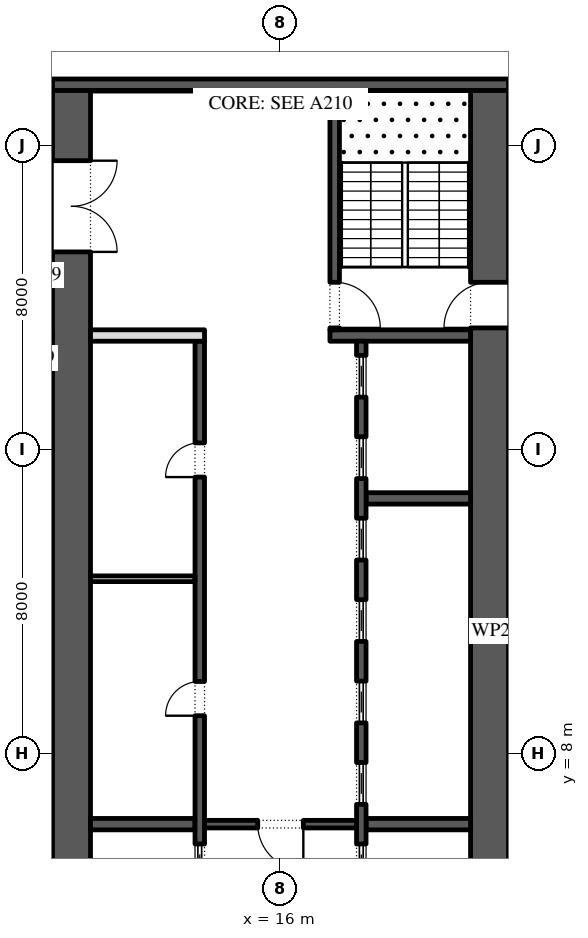
"""IFC4 building model, lengths in metres.
Left out: names, types, materials, properties, quantities, classifications, styles, units other than length and angle.
Written with IfcOpenShell. Run it as: python <this file> out.ifc"""

import sys

from ifc_helpers import new_model, si_unit, direction, frame, frame_2d, origin, place, context, subcontext, project, spatial, rectangle, extrude, element, fill, save


model = new_model("IFC4")
c1 = context("Model", 3, precision=1e-05, world=origin(), true_north=direction((0.0, 1.0)))
c2 = subcontext(c1, "Body", "Model", "MODEL_VIEW")
j1 = project(units=[si_unit("LENGTHUNIT", "METRE"), si_unit("PLANEANGLEUNIT", "RADIAN")], contexts=[c1])
p1 = place(None, origin())
s1 = spatial("IfcSite", under=j1, at=p1, CompositionType="ELEMENT")
p2 = place(p1, origin())
s2 = spatial("IfcBuilding", under=s1, at=p2, CompositionType="ELEMENT")
p3 = place(p2, frame((0.0, 0.0, 39.6)))
s3 = spatial("IfcBuildingStorey", under=s2, at=p3, CompositionType="ELEMENT", Elevation=39.6)
p4 = place(p3, frame((21.5, -2.45, 0.0), z_axis=(0.0, 0.0, 1.0), x_axis=(0.0, 1.0, 0.0)))
e1 = element("IfcWall", 1, at=p4, inside=s3, PredefinedType="SHEAR", context=c2, shape_type="SweptSolid", body=[
    extrude(rectangle(XDim=27.9, YDim=1.0, at=frame_2d((13.95, 0.0))), origin(), (0.0, 0.0, 1.0), 4.0),
])
p5 = place(p4, frame((5.05, 0.0, 0.0)))
e2 = element("IfcOpeningElement", 2, at=p5, cuts=e1, PredefinedType="OPENING", context=c2, shape_type="SweptSolid", body=[
    extrude(rectangle(XDim=1.2, YDim=2.1, at=frame_2d((0.6, 1.05))), frame((0.0, 0.51, 0.0), z_axis=(0.0, -1.0, 0.0), x_axis=(1.0, 0.0, 0.0)), (0.0, 0.0, 1.0), 1.02),
])
p6 = place(p4, frame((21.65, 0.0, 0.0)))
e3 = element("IfcOpeningElement", 3, at=p6, cuts=e1, PredefinedType="OPENING", context=c2, shape_type="SweptSolid", body=[
    extrude(rectangle(XDim=1.2, YDim=2.1, at=frame_2d((0.6, 1.05))), frame((0.0, 0.51, 0.0), z_axis=(0.0, -1.0, 0.0), x_axis=(1.0, 0.0, 0.0)), (0.0, 0.0, 1.0), 1.02),
])
p7 = place(p3, frame((10.5, -2.45, 0.0), z_axis=(0.0, 0.0, 1.0), x_axis=(0.0, 1.0, 0.0)))
e4 = element("IfcWall", 4, at=p7, inside=s3, PredefinedType="SHEAR", context=c2, shape_type="SweptSolid", body=[
    extrude(rectangle(XDim=27.9, YDim=1.0, at=frame_2d((13.95, 0.0))), origin(), (0.0, 0.0, 1.0), 4.0),
])
p8 = place(p7, frame((23.65, 0.0, 0.0)))
e5 = element("IfcOpeningElement", 5, at=p8, cuts=e4, PredefinedType="OPENING", context=c2, shape_type="SweptSolid", body=[
    extrude(rectangle(XDim=2.4, YDim=2.1, at=frame_2d((1.2, 1.05))), frame((0.0, 0.51, 0.0), z_axis=(0.0, -1.0, 0.0), x_axis=(1.0, 0.0, 0.0)), (0.0, 0.0, 1.0), 1.02),
])
p9 = place(p7, frame((1.387, 0.0, 0.0)))
e6 = element("IfcOpeningElement", 6, at=p9, cuts=e4, PredefinedType="OPENING", context=c2, shape_type="SweptSolid", body=[
    extrude(rectangle(XDim=0.9, YDim=2.1, at=frame_2d((0.45, 1.05))), frame((0.0, 0.51, 0.0), z_axis=(0.0, -1.0, 0.0), x_axis=(1.0, 0.0, 0.0)), (0.0, 0.0, 1.0), 1.02),
])
p10 = place(p7, frame((4.613, 0.0, 0.0)))
e7 = element("IfcOpeningElement", 7, at=p10, cuts=e4, PredefinedType="OPENING", context=c2, shape_type="SweptSolid", body=[
    extrude(rectangle(XDim=0.9, YDim=2.1, at=frame_2d((0.45, 1.05))), frame((0.0, 0.51, 0.0), z_axis=(0.0, -1.0, 0.0), x_axis=(1.0, 0.0, 0.0)), (0.0, 0.0, 1.0), 1.02),
])
p11 = place(p3, frame((10.0, 25.6, 0.0), z_axis=(0.0, 0.0, 1.0), x_axis=(1.0, 0.0, 0.0)))
e8 = element("IfcWall", 8, at=p11, inside=s3, PredefinedType="SHEAR", context=c2, shape_type="SweptSolid", body=[
    extrude(rectangle(XDim=12.0, YDim=0.3, at=frame_2d((6.0, 0.0))), origin(), (0.0, 0.0, 1.0), 4.0),
])
p12 = place(p3, frame((17.3, 19.0, 0.0), z_axis=(0.0, 0.0, 1.0), x_axis=(1.0, 0.0, 0.0)))
e9 = element("IfcWall", 9, at=p12, inside=s3, PredefinedType="SHEAR", context=c2, shape_type="SweptSolid", body=[
    extrude(rectangle(XDim=3.7, YDim=0.3, at=frame_2d((1.85, 0.0))), origin(), (0.0, 0.0, 1.0), 4.0),
])
p13 = place(p3, frame((17.425, 19.15, 0.0), z_axis=(0.0, 0.0, 1.0), x_axis=(0.0, 1.0, 0.0)))
e10 = element("IfcWall", 10, at=p13, inside=s3, PredefinedType="SHEAR", context=c2, shape_type="SweptSolid", body=[
    extrude(rectangle(XDim=6.3, YDim=0.25, at=frame_2d((3.15, 0.0))), origin(), (0.0, 0.0, 1.0), 4.0),
])
p14 = place(p13, frame((0.05, 0.0, 0.0)))
e11 = element("IfcOpeningElement", 11, at=p14, cuts=e10, PredefinedType="OPENING", context=c2, shape_type="SweptSolid", body=[
    extrude(rectangle(XDim=1.2, YDim=2.1, at=frame_2d((0.6, 1.05))), frame((0.0, 0.135, 0.0), z_axis=(0.0, -1.0, 0.0), x_axis=(1.0, 0.0, 0.0)), (0.0, 0.0, 1.0), 0.27),
])
for number, where, z_axis, x_axis in (
    (12, (18.25, 6.143, 0.0), (0.0, 0.0, 1.0), (1.0, 0.0, 0.0)),
    (13, (18.25, 14.714, 0.0), (0.0, 0.0, 1.0), (1.0, 0.0, 0.0)),
):
    element("IfcWall", number, at=place(p3, frame(where, z_axis=z_axis, x_axis=x_axis)), inside=s3, PredefinedType="SHEAR", context=c2, shape_type="SweptSolid", body=[
        extrude(rectangle(XDim=2.75, YDim=0.3, at=frame_2d((1.375, 0.0))), origin(), (0.0, 0.0, 1.0), 4.0),
    ])
p15 = place(p3, frame((18.125, 4.15, 0.0), z_axis=(0.0, 0.0, 1.0), x_axis=(0.0, 1.0, 0.0)))
e14 = element("IfcWall", 14, at=p15, inside=s3, PredefinedType="SHEAR", context=c2, shape_type="SweptSolid", body=[
    extrude(rectangle(XDim=14.7, YDim=0.25, at=frame_2d((7.35, 0.0))), origin(), (0.0, 0.0, 1.0), 4.0),
])
p16 = place(p15, frame((0.371, 0.0, 0.0)))
e15 = element("IfcOpeningElement", 15, at=p16, cuts=e14, PredefinedType="OPENING", context=c2, shape_type="SweptSolid", body=[
    extrude(rectangle(XDim=1.1, YDim=2.1, at=frame_2d((0.55, 1.05))), frame((0.0, 0.135, 0.0), z_axis=(0.0, -1.0, 0.0), x_axis=(1.0, 0.0, 0.0)), (0.0, 0.0, 1.0), 0.27),
])
p17 = place(p15, frame((2.514, 0.0, 0.0)))
e16 = element("IfcOpeningElement", 16, at=p17, cuts=e14, PredefinedType="OPENING", context=c2, shape_type="SweptSolid", body=[
    extrude(rectangle(XDim=1.1, YDim=2.1, at=frame_2d((0.55, 1.05))), frame((0.0, 0.135, 0.0), z_axis=(0.0, -1.0, 0.0), x_axis=(1.0, 0.0, 0.0)), (0.0, 0.0, 1.0), 0.27),
])
p18 = place(p15, frame((4.657, 0.0, 0.0)))
e17 = element("IfcOpeningElement", 17, at=p18, cuts=e14, PredefinedType="OPENING", context=c2, shape_type="SweptSolid", body=[
    extrude(rectangle(XDim=1.1, YDim=2.1, at=frame_2d((0.55, 1.05))), frame((0.0, 0.135, 0.0), z_axis=(0.0, -1.0, 0.0), x_axis=(1.0, 0.0, 0.0)), (0.0, 0.0, 1.0), 0.27),
])
p19 = place(p15, frame((6.8, 0.0, 0.0)))
e18 = element("IfcOpeningElement", 18, at=p19, cuts=e14, PredefinedType="OPENING", context=c2, shape_type="SweptSolid", body=[
    extrude(rectangle(XDim=1.1, YDim=2.1, at=frame_2d((0.55, 1.05))), frame((0.0, 0.135, 0.0), z_axis=(0.0, -1.0, 0.0), x_axis=(1.0, 0.0, 0.0)), (0.0, 0.0, 1.0), 0.27),
])
p20 = place(p15, frame((8.943, 0.0, 0.0)))
e19 = element("IfcOpeningElement", 19, at=p20, cuts=e14, PredefinedType="OPENING", context=c2, shape_type="SweptSolid", body=[
    extrude(rectangle(XDim=1.1, YDim=2.1, at=frame_2d((0.55, 1.05))), frame((0.0, 0.135, 0.0), z_axis=(0.0, -1.0, 0.0), x_axis=(1.0, 0.0, 0.0)), (0.0, 0.0, 1.0), 0.27),
])
p21 = place(p15, frame((11.086, 0.0, 0.0)))
e20 = element("IfcOpeningElement", 20, at=p21, cuts=e14, PredefinedType="OPENING", context=c2, shape_type="SweptSolid", body=[
    extrude(rectangle(XDim=1.1, YDim=2.1, at=frame_2d((0.55, 1.05))), frame((0.0, 0.135, 0.0), z_axis=(0.0, -1.0, 0.0), x_axis=(1.0, 0.0, 0.0)), (0.0, 0.0, 1.0), 0.27),
])
p22 = place(p15, frame((13.229, 0.0, 0.0)))
e21 = element("IfcOpeningElement", 21, at=p22, cuts=e14, PredefinedType="OPENING", context=c2, shape_type="SweptSolid", body=[
    extrude(rectangle(XDim=1.1, YDim=2.1, at=frame_2d((0.55, 1.05))), frame((0.0, 0.135, 0.0), z_axis=(0.0, -1.0, 0.0), x_axis=(1.0, 0.0, 0.0)), (0.0, 0.0, 1.0), 0.27),
])
p23 = place(p3, frame((11.0, 6.143, 0.0), z_axis=(0.0, 0.0, 1.0), x_axis=(1.0, 0.0, 0.0)))
e22 = element("IfcWall", 22, at=p23, inside=s3, PredefinedType="SHEAR", context=c2, shape_type="SweptSolid", body=[
    extrude(rectangle(XDim=2.75, YDim=0.3, at=frame_2d((1.375, 0.0))), origin(), (0.0, 0.0, 1.0), 4.0),
])
p24 = place(p3, frame((13.875, -2.45, 0.0), z_axis=(0.0, 0.0, 1.0), x_axis=(0.0, 1.0, 0.0)))
e23 = element("IfcWall", 23, at=p24, inside=s3, PredefinedType="SHEAR", context=c2, shape_type="SweptSolid", body=[
    extrude(rectangle(XDim=21.3, YDim=0.25, at=frame_2d((10.65, 0.0))), origin(), (0.0, 0.0, 1.0), 4.0),
])
p25 = place(p24, frame((11.446, 0.0, 0.0)))
e24 = element("IfcOpeningElement", 24, at=p25, cuts=e23, PredefinedType="OPENING", context=c2, shape_type="SweptSolid", body=[
    extrude(rectangle(XDim=0.9, YDim=2.1, at=frame_2d((0.45, 1.05))), frame((0.0, 0.135, 0.0), z_axis=(0.0, -1.0, 0.0), x_axis=(1.0, 0.0, 0.0)), (0.0, 0.0, 1.0), 0.27),
])
p26 = place(p24, frame((17.725, 0.0, 0.0)))
e25 = element("IfcOpeningElement", 25, at=p26, cuts=e23, PredefinedType="OPENING", context=c2, shape_type="SweptSolid", body=[
    extrude(rectangle(XDim=0.9, YDim=2.1, at=frame_2d((0.45, 1.05))), frame((0.0, 0.135, 0.0), z_axis=(0.0, -1.0, 0.0), x_axis=(1.0, 0.0, 0.0)), (0.0, 0.0, 1.0), 0.27),
])
p27 = place(p24, frame((6.971, 0.0, 0.0)))
e26 = element("IfcOpeningElement", 26, at=p27, cuts=e23, PredefinedType="OPENING", context=c2, shape_type="SweptSolid", body=[
    extrude(rectangle(XDim=1.1, YDim=2.1, at=frame_2d((0.55, 1.05))), frame((0.0, 0.135, 0.0), z_axis=(0.0, -1.0, 0.0), x_axis=(1.0, 0.0, 0.0)), (0.0, 0.0, 1.0), 0.27),
])
p28 = place(p3, frame((11.0, 19.0, 0.0), z_axis=(0.0, 0.0, 1.0), x_axis=(1.0, 0.0, 0.0)))
e27 = element("IfcWall", 27, at=p28, inside=s3, PredefinedType="PARTITIONING", context=c2, shape_type="SweptSolid", body=[
    extrude(rectangle(XDim=3.0, YDim=0.3, at=frame_2d((1.5, 0.0))), origin(), (0.0, 0.0, 1.0), 4.0),
])
p29 = place(p3, frame((11.0, 12.6, 0.0), z_axis=(0.0, 0.0, 1.0), x_axis=(1.0, 0.0, 0.0)))
e28 = element("IfcWall", 28, at=p29, inside=s3, PredefinedType="PARTITIONING", context=c2, shape_type="SweptSolid", body=[
    extrude(rectangle(XDim=2.75, YDim=0.15, at=frame_2d((1.375, 0.0))), origin(), (0.0, 0.0, 1.0), 4.0),
])
p30 = place(p3, frame((14.0, 6.143, 0.0), z_axis=(0.0, 0.0, 1.0), x_axis=(1.0, 0.0, 0.0)))
e29 = element("IfcWall", 29, at=p30, inside=s3, PredefinedType="SHEAR", context=c2, shape_type="SweptSolid", body=[
    extrude(rectangle(XDim=4.0, YDim=0.2, at=frame_2d((2.0, 0.0))), origin(), (0.0, 0.0, 1.0), 4.0),
])
p31 = place(p30, frame((1.4, 0.0, 0.0)))
e30 = element("IfcOpeningElement", 30, at=p31, cuts=e29, PredefinedType="OPENING", context=c2, shape_type="SweptSolid", body=[
    extrude(rectangle(XDim=1.2, YDim=2.1, at=frame_2d((0.6, 1.05))), frame((0.0, 0.11, 0.0), z_axis=(0.0, -1.0, 0.0), x_axis=(1.0, 0.0, 0.0)), (0.0, 0.0, 1.0), 0.22),
])
p32 = place(p16, origin())
e31 = element("IfcDoor", 31, at=p32, inside=s3, OperationType="SLIDING_TO_LEFT", PredefinedType="DOOR", context=c2, shape_type="SweptSolid", body=[
    extrude(rectangle(XDim=1.1, YDim=2.1, at=frame_2d((0.55, 1.05))), frame((0.0, 0.025, 0.0), z_axis=(0.0, -1.0, 0.0), x_axis=(1.0, 0.0, 0.0)), (0.0, 0.0, 1.0), 0.05),
])
fill(e15, e31)
p33 = place(p17, origin())
e32 = element("IfcDoor", 32, at=p33, inside=s3, OperationType="SLIDING_TO_LEFT", PredefinedType="DOOR", context=c2, shape_type="SweptSolid", body=[
    extrude(rectangle(XDim=1.1, YDim=2.1, at=frame_2d((0.55, 1.05))), frame((0.0, 0.025, 0.0), z_axis=(0.0, -1.0, 0.0), x_axis=(1.0, 0.0, 0.0)), (0.0, 0.0, 1.0), 0.05),
])
fill(e16, e32)
p34 = place(p18, origin())
e33 = element("IfcDoor", 33, at=p34, inside=s3, OperationType="SLIDING_TO_LEFT", PredefinedType="DOOR", context=c2, shape_type="SweptSolid", body=[
    extrude(rectangle(XDim=1.1, YDim=2.1, at=frame_2d((0.55, 1.05))), frame((0.0, 0.025, 0.0), z_axis=(0.0, -1.0, 0.0), x_axis=(1.0, 0.0, 0.0)), (0.0, 0.0, 1.0), 0.05),
])
fill(e17, e33)
p35 = place(p19, origin())
e34 = element("IfcDoor", 34, at=p35, inside=s3, OperationType="SLIDING_TO_LEFT", PredefinedType="DOOR", context=c2, shape_type="SweptSolid", body=[
    extrude(rectangle(XDim=1.1, YDim=2.1, at=frame_2d((0.55, 1.05))), frame((0.0, 0.025, 0.0), z_axis=(0.0, -1.0, 0.0), x_axis=(1.0, 0.0, 0.0)), (0.0, 0.0, 1.0), 0.05),
])
fill(e18, e34)
p36 = place(p20, origin())
e35 = element("IfcDoor", 35, at=p36, inside=s3, OperationType="SLIDING_TO_LEFT", PredefinedType="DOOR", context=c2, shape_type="SweptSolid", body=[
    extrude(rectangle(XDim=1.1, YDim=2.1, at=frame_2d((0.55, 1.05))), frame((0.0, 0.025, 0.0), z_axis=(0.0, -1.0, 0.0), x_axis=(1.0, 0.0, 0.0)), (0.0, 0.0, 1.0), 0.05),
])
fill(e19, e35)
p37 = place(p21, origin())
e36 = element("IfcDoor", 36, at=p37, inside=s3, OperationType="SLIDING_TO_LEFT", PredefinedType="DOOR", context=c2, shape_type="SweptSolid", body=[
    extrude(rectangle(XDim=1.1, YDim=2.1, at=frame_2d((0.55, 1.05))), frame((0.0, 0.025, 0.0), z_axis=(0.0, -1.0, 0.0), x_axis=(1.0, 0.0, 0.0)), (0.0, 0.0, 1.0), 0.05),
])
fill(e20, e36)
p38 = place(p22, origin())
e37 = element("IfcDoor", 37, at=p38, inside=s3, OperationType="SLIDING_TO_LEFT", PredefinedType="DOOR", context=c2, shape_type="SweptSolid", body=[
    extrude(rectangle(XDim=1.1, YDim=2.1, at=frame_2d((0.55, 1.05))), frame((0.0, 0.025, 0.0), z_axis=(0.0, -1.0, 0.0), x_axis=(1.0, 0.0, 0.0)), (0.0, 0.0, 1.0), 0.05),
])
fill(e21, e37)
p39 = place(p25, origin())
e38 = element("IfcDoor", 38, at=p39, inside=s3, OperationType="SINGLE_SWING_RIGHT", PredefinedType="DOOR", context=c2, shape_type="SweptSolid", body=[
    extrude(rectangle(XDim=0.9, YDim=2.1, at=frame_2d((0.45, 1.05))), frame((0.0, 0.125, 0.0), z_axis=(0.0, -1.0, 0.0), x_axis=(1.0, 0.0, 0.0)), (0.0, 0.0, 1.0), 0.05),
])
fill(e24, e38)
p40 = place(p26, origin())
e39 = element("IfcDoor", 39, at=p40, inside=s3, OperationType="SINGLE_SWING_RIGHT", PredefinedType="DOOR", context=c2, shape_type="SweptSolid", body=[
    extrude(rectangle(XDim=0.9, YDim=2.1, at=frame_2d((0.45, 1.05))), frame((0.0, 0.125, 0.0), z_axis=(0.0, -1.0, 0.0), x_axis=(1.0, 0.0, 0.0)), (0.0, 0.0, 1.0), 0.05),
])
fill(e25, e39)
p41 = place(p27, origin())
e40 = element("IfcDoor", 40, at=p41, inside=s3, OperationType="SLIDING_TO_LEFT", PredefinedType="DOOR", context=c2, shape_type="SweptSolid", body=[
    extrude(rectangle(XDim=1.1, YDim=2.1, at=frame_2d((0.55, 1.05))), frame((0.0, 0.025, 0.0), z_axis=(0.0, -1.0, 0.0), x_axis=(1.0, 0.0, 0.0)), (0.0, 0.0, 1.0), 0.05),
])
fill(e26, e40)
p42 = place(p31, frame((1.2, 0.0, 0.0), z_axis=(0.0, 0.0, 1.0), x_axis=(-1.0, 0.0, 0.0)))
e41 = element("IfcDoor", 41, at=p42, inside=s3, OperationType="SINGLE_SWING_RIGHT", PredefinedType="DOOR", context=c2, shape_type="SweptSolid", body=[
    extrude(rectangle(XDim=1.2, YDim=2.1, at=frame_2d((0.6, 1.05))), frame((0.0, 0.025, 0.0), z_axis=(0.0, -1.0, 0.0), x_axis=(1.0, 0.0, 0.0)), (0.0, 0.0, 1.0), 0.05),
])
fill(e30, e41)
p43 = place(p8, frame((2.4, 0.0, 0.0), z_axis=(0.0, 0.0, 1.0), x_axis=(-1.0, 0.0, 0.0)))
e42 = element("IfcDoor", 42, at=p43, inside=s3, OperationType="DOUBLE_DOOR_SINGLE_SWING", PredefinedType="DOOR", context=c2, shape_type="SweptSolid", body=[
    extrude(rectangle(XDim=2.4, YDim=2.1, at=frame_2d((1.2, 1.05))), frame((0.0, 0.025, 0.0), z_axis=(0.0, -1.0, 0.0), x_axis=(1.0, 0.0, 0.0)), (0.0, 0.0, 1.0), 0.05),
])
fill(e5, e42)
p44 = place(p14, frame((1.2, 0.0, 0.0), z_axis=(0.0, 0.0, 1.0), x_axis=(-1.0, 0.0, 0.0)))
e43 = element("IfcDoor", 43, at=p44, inside=s3, OperationType="SINGLE_SWING_LEFT", PredefinedType="DOOR", context=c2, shape_type="SweptSolid", body=[
    extrude(rectangle(XDim=1.2, YDim=2.1, at=frame_2d((0.6, 1.05))), frame((0.0, 0.025, 0.0), z_axis=(0.0, -1.0, 0.0), x_axis=(1.0, 0.0, 0.0)), (0.0, 0.0, 1.0), 0.05),
])
fill(e11, e43)
p45 = place(p6, origin())
e44 = element("IfcDoor", 44, at=p45, inside=s3, OperationType="SINGLE_SWING_RIGHT", PredefinedType="DOOR", context=c2, shape_type="SweptSolid", body=[
    extrude(rectangle(XDim=1.2, YDim=2.1, at=frame_2d((0.6, 1.05))), frame((0.0, 0.025, 0.0), z_axis=(0.0, -1.0, 0.0), x_axis=(1.0, 0.0, 0.0)), (0.0, 0.0, 1.0), 0.05),
])
fill(e3, e44)
save(model, sys.argv[1])
